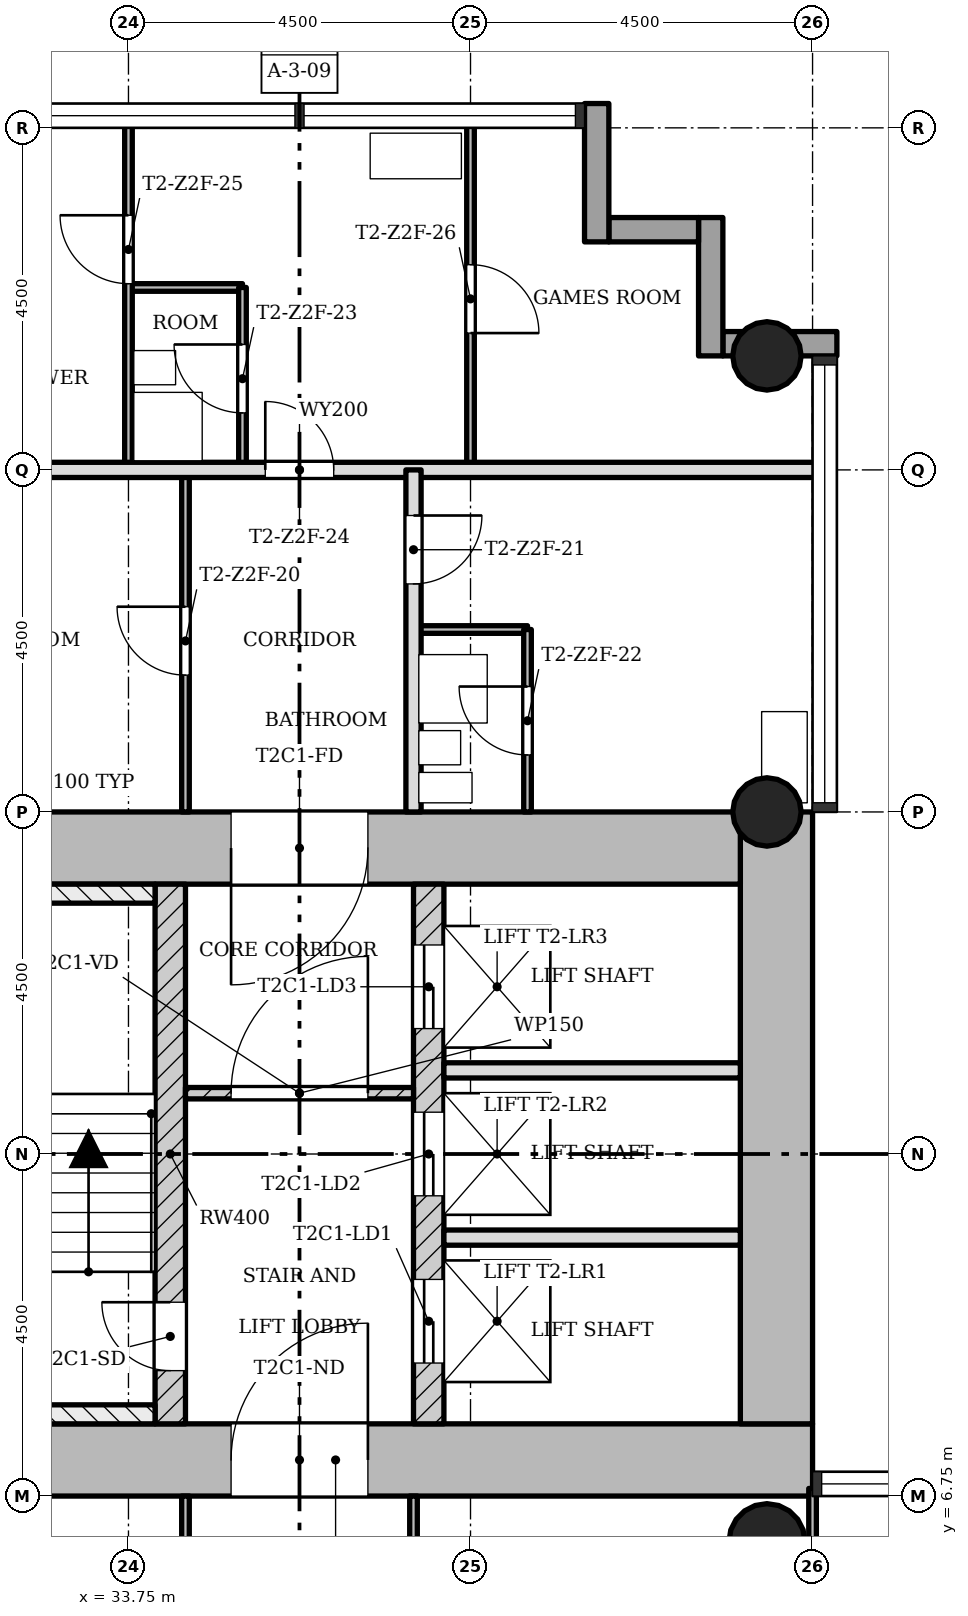
"""IFC4 building model, lengths in metres.
Left out: names, types, materials, properties, quantities, classifications, styles, units other than length and angle.
Written with IfcOpenShell. Run it as: python <this file> out.ifc"""

import sys

from ifc_helpers import new_model, si_unit, direction, frame, frame_2d, origin, origin_2d, place, context, subcontext, project, spatial, rectangle, hollow_circle, extrude, element, fill, save


model = new_model("IFC4")
c1 = context("Model", 3, precision=1e-05, world=origin(), true_north=direction((0.0, 1.0)))
c2 = subcontext(c1, "Body", "Model", "MODEL_VIEW")
j1 = project(units=[si_unit("LENGTHUNIT", "METRE"), si_unit("PLANEANGLEUNIT", "RADIAN")], contexts=[c1])
p1 = place(None, origin())
s1 = spatial("IfcSite", under=j1, at=p1, CompositionType="ELEMENT")
p2 = place(p1, origin())
s2 = spatial("IfcBuilding", under=s1, at=p2, CompositionType="ELEMENT")
p3 = place(p2, frame((0.0, 0.0, 110.6)))
s3 = spatial("IfcBuildingStorey", under=s2, at=p3, CompositionType="ELEMENT", Elevation=110.6)
p4 = place(p3, frame((30.2, 7.225, 0.0), z_axis=(0.0, 0.0, 1.0), x_axis=(1.0, 0.0, 0.0)))
e1 = element("IfcWall", 1, at=p4, inside=s3, PredefinedType="SHEAR", context=c2, shape_type="SweptSolid", body=[
    extrude(rectangle(XDim=12.55, YDim=0.95, at=frame_2d((6.275, 0.0))), origin(), (0.0, 0.0, 1.0), 3.4),
])
p5 = place(p4, frame((4.9, 0.0, 0.0)))
e2 = element("IfcOpeningElement", 2, at=p5, cuts=e1, PredefinedType="OPENING", context=c2, shape_type="SweptSolid", body=[
    extrude(rectangle(XDim=1.8, YDim=2.1, at=frame_2d((0.9, 1.05))), frame((0.0, 0.485, 0.0), z_axis=(0.0, -1.0, 0.0), x_axis=(1.0, 0.0, 0.0)), (0.0, 0.0, 1.0), 0.97),
])
p6 = place(p3, frame((42.275, 7.7, 0.0), z_axis=(0.0, 0.0, 1.0), x_axis=(0.0, 1.0, 0.0)))
e3 = element("IfcWall", 3, at=p6, inside=s3, PredefinedType="SHEAR", context=c2, shape_type="SweptSolid", body=[
    extrude(rectangle(XDim=8.05, YDim=0.95, at=frame_2d((4.025, 0.0))), origin(), (0.0, 0.0, 1.0), 3.4),
])
p7 = place(p3, frame((41.8, 15.275, 0.0), z_axis=(0.0, 0.0, 1.0), x_axis=(-1.0, 0.0, 0.0)))
e4 = element("IfcWall", 4, at=p7, inside=s3, PredefinedType="SHEAR", context=c2, shape_type="SweptSolid", body=[
    extrude(rectangle(XDim=12.55, YDim=0.95, at=frame_2d((6.275, 0.0))), origin(), (0.0, 0.0, 1.0), 3.4),
])
p8 = place(p7, frame((4.9, 0.0, 0.0)))
e5 = element("IfcOpeningElement", 5, at=p8, cuts=e4, PredefinedType="OPENING", context=c2, shape_type="SweptSolid", body=[
    extrude(rectangle(XDim=1.8, YDim=2.1, at=frame_2d((0.9, 1.05))), frame((0.0, 0.485, 0.0), z_axis=(0.0, -1.0, 0.0), x_axis=(1.0, 0.0, 0.0)), (0.0, 0.0, 1.0), 0.97),
])
p9 = place(p3, frame((34.3, 7.7, 0.0), z_axis=(0.0, 0.0, 1.0), x_axis=(0.0, 1.0, 0.0)))
e6 = element("IfcWall", 6, at=p9, inside=s3, PredefinedType="SHEAR", context=c2, shape_type="SweptSolid", body=[
    extrude(rectangle(XDim=7.1, YDim=0.4, at=frame_2d((3.55, 0.0))), origin(), (0.0, 0.0, 1.0), 3.4),
])
p10 = place(p9, frame((0.7, 0.0, 0.0)))
e7 = element("IfcOpeningElement", 7, at=p10, cuts=e6, PredefinedType="OPENING", context=c2, shape_type="SweptSolid", body=[
    extrude(rectangle(XDim=0.9, YDim=2.1, at=frame_2d((0.45, 1.05))), frame((0.0, 0.21, 0.0), z_axis=(0.0, -1.0, 0.0), x_axis=(1.0, 0.0, 0.0)), (0.0, 0.0, 1.0), 0.42),
])
p11 = place(p3, frame((37.7, 7.7, 0.0), z_axis=(0.0, 0.0, 1.0), x_axis=(0.0, 1.0, 0.0)))
e8 = element("IfcWall", 8, at=p11, inside=s3, PredefinedType="SHEAR", context=c2, shape_type="SweptSolid", body=[
    extrude(rectangle(XDim=7.1, YDim=0.4, at=frame_2d((3.55, 0.0))), origin(), (0.0, 0.0, 1.0), 3.4),
])
p12 = place(p11, frame((0.8, 0.0, 0.0)))
e9 = element("IfcOpeningElement", 9, at=p12, cuts=e8, PredefinedType="OPENING", context=c2, shape_type="SweptSolid", body=[
    extrude(rectangle(XDim=1.1, YDim=2.1, at=frame_2d((0.55, 1.05))), frame((0.0, 0.21, 0.0), z_axis=(0.0, -1.0, 0.0), x_axis=(1.0, 0.0, 0.0)), (0.0, 0.0, 1.0), 0.42),
])
p13 = place(p11, frame((3.0, 0.0, 0.0)))
e10 = element("IfcOpeningElement", 10, at=p13, cuts=e8, PredefinedType="OPENING", context=c2, shape_type="SweptSolid", body=[
    extrude(rectangle(XDim=1.1, YDim=2.1, at=frame_2d((0.55, 1.05))), frame((0.0, 0.21, 0.0), z_axis=(0.0, -1.0, 0.0), x_axis=(1.0, 0.0, 0.0)), (0.0, 0.0, 1.0), 0.42),
])
p14 = place(p11, frame((5.2, 0.0, 0.0)))
e11 = element("IfcOpeningElement", 11, at=p14, cuts=e8, PredefinedType="OPENING", context=c2, shape_type="SweptSolid", body=[
    extrude(rectangle(XDim=1.1, YDim=2.1, at=frame_2d((0.55, 1.05))), frame((0.0, 0.21, 0.0), z_axis=(0.0, -1.0, 0.0), x_axis=(1.0, 0.0, 0.0)), (0.0, 0.0, 1.0), 0.42),
])
for number, where, z_axis, x_axis in (
    (12, (42.15, 15.75, 0.0), (0.0, 0.0, 1.0), (1.0, 0.0, 0.0)),
    (13, (42.15, 21.75, 0.0), (0.0, 0.0, 1.0), (1.0, 0.0, 0.0)),
):
    element("IfcColumn", number, at=place(p3, frame(where, z_axis=z_axis, x_axis=x_axis)), inside=s3, PredefinedType="COLUMN", context=c2, shape_type="SweptSolid", body=[
        extrude(hollow_circle(Radius=0.45, WallThickness=0.032, at=origin_2d()), origin(), (0.0, 0.0, 1.0), 3.4),
    ])
p15 = place(p3, frame((42.15, 6.15, 0.0), z_axis=(0.0, 0.0, 1.0), x_axis=(1.0, 0.0, 0.0)))
e14 = element("IfcColumn", 14, at=p15, inside=s3, PredefinedType="COLUMN", context=c2, shape_type="SweptSolid", body=[
    extrude(hollow_circle(Radius=0.5, WallThickness=0.036, at=origin_2d()), origin(), (0.0, 0.0, 1.0), 3.4),
])
p16 = place(p3, frame((43.07, 21.91, -0.3), z_axis=(0.0, 0.0, 1.0), x_axis=(-1.0, 0.0, 0.0)))
e15 = element("IfcWall", 15, at=p16, inside=s3, PredefinedType="STANDARD", context=c2, shape_type="SweptSolid", body=[
    extrude(rectangle(XDim=1.5, YDim=0.32, at=frame_2d((0.75, 0.0))), origin(), (0.0, 0.0, 1.0), 3.4),
])
p17 = place(p3, frame((41.41, 21.75, -0.3), z_axis=(0.0, 0.0, 1.0), x_axis=(0.0, 1.0, 0.0)))
e16 = element("IfcWall", 16, at=p17, inside=s3, PredefinedType="STANDARD", context=c2, shape_type="SweptSolid", body=[
    extrude(rectangle(XDim=1.82, YDim=0.32, at=frame_2d((0.91, 0.0))), origin(), (0.0, 0.0, 1.0), 3.4),
])
p18 = place(p3, frame((41.25, 23.41, -0.3), z_axis=(0.0, 0.0, 1.0), x_axis=(-1.0, 0.0, 0.0)))
e17 = element("IfcWall", 17, at=p18, inside=s3, PredefinedType="STANDARD", context=c2, shape_type="SweptSolid", body=[
    extrude(rectangle(XDim=1.18, YDim=0.32, at=frame_2d((0.59, 0.0))), origin(), (0.0, 0.0, 1.0), 3.4),
])
p19 = place(p3, frame((39.91, 23.25, -0.3), z_axis=(0.0, 0.0, 1.0), x_axis=(0.0, 1.0, 0.0)))
e18 = element("IfcWall", 18, at=p19, inside=s3, PredefinedType="STANDARD", context=c2, shape_type="SweptSolid", body=[
    extrude(rectangle(XDim=1.82, YDim=0.32, at=frame_2d((0.91, 0.0))), origin(), (0.0, 0.0, 1.0), 3.4),
])
p20 = place(p3, frame((37.5, 12.05, 0.0), z_axis=(0.0, 0.0, 1.0), x_axis=(-1.0, 0.0, 0.0)))
e19 = element("IfcWall", 19, at=p20, inside=s3, PredefinedType="PARTITIONING", context=c2, shape_type="SweptSolid", body=[
    extrude(rectangle(XDim=3.0, YDim=0.15, at=frame_2d((1.5, 0.0))), origin(), (0.0, 0.0, 1.0), 3.0),
])
p21 = place(p20, frame((0.6, 0.0, 0.0)))
e20 = element("IfcOpeningElement", 20, at=p21, cuts=e19, PredefinedType="OPENING", context=c2, shape_type="SweptSolid", body=[
    extrude(rectangle(XDim=1.8, YDim=2.1, at=frame_2d((0.9, 1.05))), frame((0.0, 0.085, 0.0), z_axis=(0.0, -1.0, 0.0), x_axis=(1.0, 0.0, 0.0)), (0.0, 0.0, 1.0), 0.17),
])
for number, where, z_axis, x_axis in (
    (21, (41.8, 10.15, 0.0), (0.0, 0.0, 1.0), (-1.0, 0.0, 0.0)),
    (22, (41.8, 12.35, 0.0), (0.0, 0.0, 1.0), (-1.0, 0.0, 0.0)),
):
    element("IfcWall", number, at=place(p3, frame(where, z_axis=z_axis, x_axis=x_axis)), inside=s3, PredefinedType="SOLIDWALL", context=c2, shape_type="SweptSolid", body=[
        extrude(rectangle(XDim=3.9, YDim=0.2, at=frame_2d((1.95, 0.0))), origin(), (0.0, 0.0, 1.0), 3.0),
    ])
p22 = place(p3, frame((39.0, 18.15, 0.0), z_axis=(0.0, 0.0, 1.0), x_axis=(-1.0, 0.0, 0.0)))
e23 = element("IfcWall", 23, at=p22, inside=s3, PredefinedType="PARTITIONING", context=c2, shape_type="SweptSolid", body=[
    extrude(rectangle(XDim=1.5, YDim=0.1, at=frame_2d((0.75, 0.0))), origin(), (0.0, 0.0, 1.0), 3.0),
])
p23 = place(p3, frame((42.85, 20.25, 0.0), z_axis=(0.0, 0.0, 1.0), x_axis=(-1.0, 0.0, 0.0)))
e24 = element("IfcWall", 24, at=p23, inside=s3, PredefinedType="SOLIDWALL", context=c2, shape_type="SweptSolid", body=[
    extrude(rectangle(XDim=13.7, YDim=0.2, at=frame_2d((6.85, 0.0))), origin(), (0.0, 0.0, 1.0), 3.0),
])
p24 = place(p23, frame((6.4, 0.0, 0.0)))
e25 = element("IfcOpeningElement", 25, at=p24, cuts=e24, PredefinedType="OPENING", context=c2, shape_type="SweptSolid", body=[
    extrude(rectangle(XDim=0.9, YDim=2.1, at=frame_2d((0.45, 1.05))), frame((0.0, 0.11, 0.0), z_axis=(0.0, -1.0, 0.0), x_axis=(1.0, 0.0, 0.0)), (0.0, 0.0, 1.0), 0.22),
])
p25 = place(p3, frame((35.25, 22.65, 0.0), z_axis=(0.0, 0.0, 1.0), x_axis=(-1.0, 0.0, 0.0)))
e26 = element("IfcWall", 26, at=p25, inside=s3, PredefinedType="PARTITIONING", context=c2, shape_type="SweptSolid", body=[
    extrude(rectangle(XDim=1.5, YDim=0.1, at=frame_2d((0.75, 0.0))), origin(), (0.0, 0.0, 1.0), 3.0),
])
p26 = place(p3, frame((42.75, 0.9, 0.0), z_axis=(0.0, 0.0, 1.0), x_axis=(0.0, 1.0, 0.0)))
e27 = element("IfcWall", 27, at=p26, inside=s3, PredefinedType="PARTITIONING", context=c2, shape_type="SweptSolid", body=[
    extrude(rectangle(XDim=5.95, YDim=0.1, at=frame_2d((2.975, 0.0))), origin(), (0.0, 0.0, 1.0), 3.0),
])
p27 = place(p3, frame((39.0, 15.75, 0.0), z_axis=(0.0, 0.0, 1.0), x_axis=(0.0, 1.0, 0.0)))
e28 = element("IfcWall", 28, at=p27, inside=s3, PredefinedType="PARTITIONING", context=c2, shape_type="SweptSolid", body=[
    extrude(rectangle(XDim=2.4, YDim=0.1, at=frame_2d((1.2, 0.0))), origin(), (0.0, 0.0, 1.0), 3.0),
])
p28 = place(p27, frame((0.75, 0.0, 0.0)))
e29 = element("IfcOpeningElement", 29, at=p28, cuts=e28, PredefinedType="OPENING", context=c2, shape_type="SweptSolid", body=[
    extrude(rectangle(XDim=0.9, YDim=2.1, at=frame_2d((0.45, 1.05))), frame((0.0, 0.06, 0.0), z_axis=(0.0, -1.0, 0.0), x_axis=(1.0, 0.0, 0.0)), (0.0, 0.0, 1.0), 0.12),
])
p29 = place(p3, frame((38.25, 20.25, 0.0), z_axis=(0.0, 0.0, 1.0), x_axis=(0.0, 1.0, 0.0)))
e30 = element("IfcWall", 30, at=p29, inside=s3, PredefinedType="PARTITIONING", context=c2, shape_type="SweptSolid", body=[
    extrude(rectangle(XDim=4.6, YDim=0.1, at=frame_2d((2.3, 0.0))), origin(), (0.0, 0.0, 1.0), 3.0),
])
p30 = place(p29, frame((1.8, 0.0, 0.0)))
e31 = element("IfcOpeningElement", 31, at=p30, cuts=e30, PredefinedType="OPENING", context=c2, shape_type="SweptSolid", body=[
    extrude(rectangle(XDim=0.9, YDim=2.1, at=frame_2d((0.45, 1.05))), frame((0.0, 0.06, 0.0), z_axis=(0.0, -1.0, 0.0), x_axis=(1.0, 0.0, 0.0)), (0.0, 0.0, 1.0), 0.12),
])
p31 = place(p3, frame((37.5, 0.9, 0.0), z_axis=(0.0, 0.0, 1.0), x_axis=(0.0, 1.0, 0.0)))
e32 = element("IfcWall", 32, at=p31, inside=s3, PredefinedType="PARTITIONING", context=c2, shape_type="SweptSolid", body=[
    extrude(rectangle(XDim=5.85, YDim=0.1, at=frame_2d((2.925, 0.0))), origin(), (0.0, 0.0, 1.0), 3.0),
])
p32 = place(p31, frame((2.475, 0.0, 0.0)))
e33 = element("IfcOpeningElement", 33, at=p32, cuts=e32, PredefinedType="OPENING", context=c2, shape_type="SweptSolid", body=[
    extrude(rectangle(XDim=0.9, YDim=2.1, at=frame_2d((0.45, 1.05))), frame((0.0, 0.06, 0.0), z_axis=(0.0, -1.0, 0.0), x_axis=(1.0, 0.0, 0.0)), (0.0, 0.0, 1.0), 0.12),
])
p33 = place(p3, frame((37.5, 15.75, 0.0), z_axis=(0.0, 0.0, 1.0), x_axis=(0.0, 1.0, 0.0)))
e34 = element("IfcWall", 34, at=p33, inside=s3, PredefinedType="SOLIDWALL", context=c2, shape_type="SweptSolid", body=[
    extrude(rectangle(XDim=4.5, YDim=0.2, at=frame_2d((2.25, 0.0))), origin(), (0.0, 0.0, 1.0), 3.0),
])
p34 = place(p33, frame((3.0, 0.0, 0.0)))
e35 = element("IfcOpeningElement", 35, at=p34, cuts=e34, PredefinedType="OPENING", context=c2, shape_type="SweptSolid", body=[
    extrude(rectangle(XDim=0.9, YDim=2.1, at=frame_2d((0.45, 1.05))), frame((0.0, 0.11, 0.0), z_axis=(0.0, -1.0, 0.0), x_axis=(1.0, 0.0, 0.0)), (0.0, 0.0, 1.0), 0.22),
])
p35 = place(p3, frame((35.25, 20.25, 0.0), z_axis=(0.0, 0.0, 1.0), x_axis=(0.0, 1.0, 0.0)))
e36 = element("IfcWall", 36, at=p35, inside=s3, PredefinedType="PARTITIONING", context=c2, shape_type="SweptSolid", body=[
    extrude(rectangle(XDim=2.4, YDim=0.1, at=frame_2d((1.2, 0.0))), origin(), (0.0, 0.0, 1.0), 3.0),
])
p36 = place(p35, frame((0.75, 0.0, 0.0)))
e37 = element("IfcOpeningElement", 37, at=p36, cuts=e36, PredefinedType="OPENING", context=c2, shape_type="SweptSolid", body=[
    extrude(rectangle(XDim=0.9, YDim=2.1, at=frame_2d((0.45, 1.05))), frame((0.0, 0.06, 0.0), z_axis=(0.0, -1.0, 0.0), x_axis=(1.0, 0.0, 0.0)), (0.0, 0.0, 1.0), 0.12),
])
p37 = place(p3, frame((34.5, 0.9, 0.0), z_axis=(0.0, 0.0, 1.0), x_axis=(0.0, 1.0, 0.0)))
e38 = element("IfcWall", 38, at=p37, inside=s3, PredefinedType="PARTITIONING", context=c2, shape_type="SweptSolid", body=[
    extrude(rectangle(XDim=5.85, YDim=0.1, at=frame_2d((2.925, 0.0))), origin(), (0.0, 0.0, 1.0), 3.0),
])
p38 = place(p37, frame((3.375, 0.0, 0.0)))
e39 = element("IfcOpeningElement", 39, at=p38, cuts=e38, PredefinedType="OPENING", context=c2, shape_type="SweptSolid", body=[
    extrude(rectangle(XDim=0.9, YDim=2.1, at=frame_2d((0.45, 1.05))), frame((0.0, 0.06, 0.0), z_axis=(0.0, -1.0, 0.0), x_axis=(1.0, 0.0, 0.0)), (0.0, 0.0, 1.0), 0.12),
])
p39 = place(p3, frame((34.5, 15.75, 0.0), z_axis=(0.0, 0.0, 1.0), x_axis=(0.0, 1.0, 0.0)))
e40 = element("IfcWall", 40, at=p39, inside=s3, PredefinedType="PARTITIONING", context=c2, shape_type="SweptSolid", body=[
    extrude(rectangle(XDim=4.5, YDim=0.1, at=frame_2d((2.25, 0.0))), origin(), (0.0, 0.0, 1.0), 3.0),
])
p40 = place(p39, frame((1.8, 0.0, 0.0)))
e41 = element("IfcOpeningElement", 41, at=p40, cuts=e40, PredefinedType="OPENING", context=c2, shape_type="SweptSolid", body=[
    extrude(rectangle(XDim=0.9, YDim=2.1, at=frame_2d((0.45, 1.05))), frame((0.0, 0.06, 0.0), z_axis=(0.0, -1.0, 0.0), x_axis=(1.0, 0.0, 0.0)), (0.0, 0.0, 1.0), 0.12),
])
p41 = place(p3, frame((33.75, 20.25, 0.0), z_axis=(0.0, 0.0, 1.0), x_axis=(0.0, 1.0, 0.0)))
e42 = element("IfcWall", 42, at=p41, inside=s3, PredefinedType="PARTITIONING", context=c2, shape_type="SweptSolid", body=[
    extrude(rectangle(XDim=4.6, YDim=0.1, at=frame_2d((2.3, 0.0))), origin(), (0.0, 0.0, 1.0), 3.0),
])
p42 = place(p41, frame((2.45, 0.0, 0.0)))
e43 = element("IfcOpeningElement", 43, at=p42, cuts=e42, PredefinedType="OPENING", context=c2, shape_type="SweptSolid", body=[
    extrude(rectangle(XDim=0.9, YDim=2.1, at=frame_2d((0.45, 1.05))), frame((0.0, 0.06, 0.0), z_axis=(0.0, -1.0, 0.0), x_axis=(1.0, 0.0, 0.0)), (0.0, 0.0, 1.0), 0.12),
])
for number, where, z_axis, x_axis in (
    (44, (34.1, 14.675, 0.0), (0.0, 0.0, 1.0), (-1.0, 0.0, 0.0)),
    (45, (34.1, 7.825, 0.0), (0.0, 0.0, 1.0), (-1.0, 0.0, 0.0)),
):
    element("IfcWall", number, at=place(p3, frame(where, z_axis=z_axis, x_axis=x_axis)), inside=s3, PredefinedType="SHEAR", context=c2, shape_type="SweptSolid", body=[
        extrude(rectangle(XDim=3.9, YDim=0.25, at=frame_2d((1.95, 0.0))), origin(), (0.0, 0.0, 1.0), 3.4),
    ])
p43 = place(p21, origin())
e46 = element("IfcDoor", 46, at=p43, inside=s3, OperationType="SINGLE_SWING_LEFT", PredefinedType="DOOR", context=c2, shape_type="SweptSolid", body=[
    extrude(rectangle(XDim=1.8, YDim=2.1, at=frame_2d((0.9, 1.05))), frame((0.0, 0.025, 0.0), z_axis=(0.0, -1.0, 0.0), x_axis=(1.0, 0.0, 0.0)), (0.0, 0.0, 1.0), 0.05),
])
fill(e20, e46)
p44 = place(p40, origin())
e47 = element("IfcDoor", 47, at=p44, inside=s3, OperationType="SINGLE_SWING_LEFT", PredefinedType="DOOR", context=c2, shape_type="SweptSolid", body=[
    extrude(rectangle(XDim=0.9, YDim=2.1, at=frame_2d((0.45, 1.05))), frame((0.0, 0.025, 0.0), z_axis=(0.0, -1.0, 0.0), x_axis=(1.0, 0.0, 0.0)), (0.0, 0.0, 1.0), 0.05),
])
fill(e41, e47)
p45 = place(p34, origin())
e48 = element("IfcDoor", 48, at=p45, inside=s3, OperationType="SINGLE_SWING_RIGHT", PredefinedType="DOOR", context=c2, shape_type="SweptSolid", body=[
    extrude(rectangle(XDim=0.9, YDim=2.1, at=frame_2d((0.45, 1.05))), frame((0.0, 0.025, 0.0), z_axis=(0.0, -1.0, 0.0), x_axis=(1.0, 0.0, 0.0)), (0.0, 0.0, 1.0), 0.05),
])
fill(e35, e48)
p46 = place(p28, origin())
e49 = element("IfcDoor", 49, at=p46, inside=s3, OperationType="SINGLE_SWING_LEFT", PredefinedType="DOOR", context=c2, shape_type="SweptSolid", body=[
    extrude(rectangle(XDim=0.9, YDim=2.1, at=frame_2d((0.45, 1.05))), frame((0.0, 0.025, 0.0), z_axis=(0.0, -1.0, 0.0), x_axis=(1.0, 0.0, 0.0)), (0.0, 0.0, 1.0), 0.05),
])
fill(e29, e49)
p47 = place(p36, origin())
e50 = element("IfcDoor", 50, at=p47, inside=s3, OperationType="SINGLE_SWING_LEFT", PredefinedType="DOOR", context=c2, shape_type="SweptSolid", body=[
    extrude(rectangle(XDim=0.9, YDim=2.1, at=frame_2d((0.45, 1.05))), frame((0.0, 0.025, 0.0), z_axis=(0.0, -1.0, 0.0), x_axis=(1.0, 0.0, 0.0)), (0.0, 0.0, 1.0), 0.05),
])
fill(e37, e50)
p48 = place(p24, origin())
e51 = element("IfcDoor", 51, at=p48, inside=s3, OperationType="SINGLE_SWING_RIGHT", PredefinedType="DOOR", context=c2, shape_type="SweptSolid", body=[
    extrude(rectangle(XDim=0.9, YDim=2.1, at=frame_2d((0.45, 1.05))), frame((0.0, 0.025, 0.0), z_axis=(0.0, -1.0, 0.0), x_axis=(1.0, 0.0, 0.0)), (0.0, 0.0, 1.0), 0.05),
])
fill(e25, e51)
p49 = place(p42, origin())
e52 = element("IfcDoor", 52, at=p49, inside=s3, OperationType="SINGLE_SWING_LEFT", PredefinedType="DOOR", context=c2, shape_type="SweptSolid", body=[
    extrude(rectangle(XDim=0.9, YDim=2.1, at=frame_2d((0.45, 1.05))), frame((0.0, 0.025, 0.0), z_axis=(0.0, -1.0, 0.0), x_axis=(1.0, 0.0, 0.0)), (0.0, 0.0, 1.0), 0.05),
])
fill(e43, e52)
p50 = place(p30, origin())
e53 = element("IfcDoor", 53, at=p50, inside=s3, OperationType="SINGLE_SWING_LEFT", PredefinedType="DOOR", context=c2, shape_type="SweptSolid", body=[
    extrude(rectangle(XDim=0.9, YDim=2.1, at=frame_2d((0.45, 1.05))), frame((0.0, 0.025, 0.0), z_axis=(0.0, -1.0, 0.0), x_axis=(1.0, 0.0, 0.0)), (0.0, 0.0, 1.0), 0.05),
])
fill(e31, e53)
p51 = place(p10, origin())
e54 = element("IfcDoor", 54, at=p51, inside=s3, OperationType="SINGLE_SWING_LEFT", PredefinedType="DOOR", context=c2, shape_type="SweptSolid", body=[
    extrude(rectangle(XDim=0.9, YDim=2.1, at=frame_2d((0.45, 1.05))), frame((0.0, 0.025, 0.0), z_axis=(0.0, -1.0, 0.0), x_axis=(1.0, 0.0, 0.0)), (0.0, 0.0, 1.0), 0.05),
])
fill(e7, e54)
p52 = place(p12, origin())
e55 = element("IfcDoor", 55, at=p52, inside=s3, OperationType="SLIDING_TO_LEFT", PredefinedType="DOOR", context=c2, shape_type="SweptSolid", body=[
    extrude(rectangle(XDim=1.1, YDim=2.1, at=frame_2d((0.55, 1.05))), frame((0.0, 0.025, 0.0), z_axis=(0.0, -1.0, 0.0), x_axis=(1.0, 0.0, 0.0)), (0.0, 0.0, 1.0), 0.05),
])
fill(e9, e55)
p53 = place(p13, origin())
e56 = element("IfcDoor", 56, at=p53, inside=s3, OperationType="SLIDING_TO_LEFT", PredefinedType="DOOR", context=c2, shape_type="SweptSolid", body=[
    extrude(rectangle(XDim=1.1, YDim=2.1, at=frame_2d((0.55, 1.05))), frame((0.0, 0.025, 0.0), z_axis=(0.0, -1.0, 0.0), x_axis=(1.0, 0.0, 0.0)), (0.0, 0.0, 1.0), 0.05),
])
fill(e10, e56)
p54 = place(p14, origin())
e57 = element("IfcDoor", 57, at=p54, inside=s3, OperationType="SLIDING_TO_LEFT", PredefinedType="DOOR", context=c2, shape_type="SweptSolid", body=[
    extrude(rectangle(XDim=1.1, YDim=2.1, at=frame_2d((0.55, 1.05))), frame((0.0, 0.025, 0.0), z_axis=(0.0, -1.0, 0.0), x_axis=(1.0, 0.0, 0.0)), (0.0, 0.0, 1.0), 0.05),
])
fill(e11, e57)
p55 = place(p5, origin())
e58 = element("IfcDoor", 58, at=p55, inside=s3, OperationType="SINGLE_SWING_LEFT", PredefinedType="DOOR", context=c2, shape_type="SweptSolid", body=[
    extrude(rectangle(XDim=1.8, YDim=2.1, at=frame_2d((0.9, 1.05))), frame((0.0, 0.025, 0.0), z_axis=(0.0, -1.0, 0.0), x_axis=(1.0, 0.0, 0.0)), (0.0, 0.0, 1.0), 0.05),
])
fill(e2, e58)
p56 = place(p8, origin())
e59 = element("IfcDoor", 59, at=p56, inside=s3, OperationType="SINGLE_SWING_LEFT", PredefinedType="DOOR", context=c2, shape_type="SweptSolid", body=[
    extrude(rectangle(XDim=1.8, YDim=2.1, at=frame_2d((0.9, 1.05))), frame((0.0, 0.025, 0.0), z_axis=(0.0, -1.0, 0.0), x_axis=(1.0, 0.0, 0.0)), (0.0, 0.0, 1.0), 0.05),
])
fill(e5, e59)
save(model, sys.argv[1])
